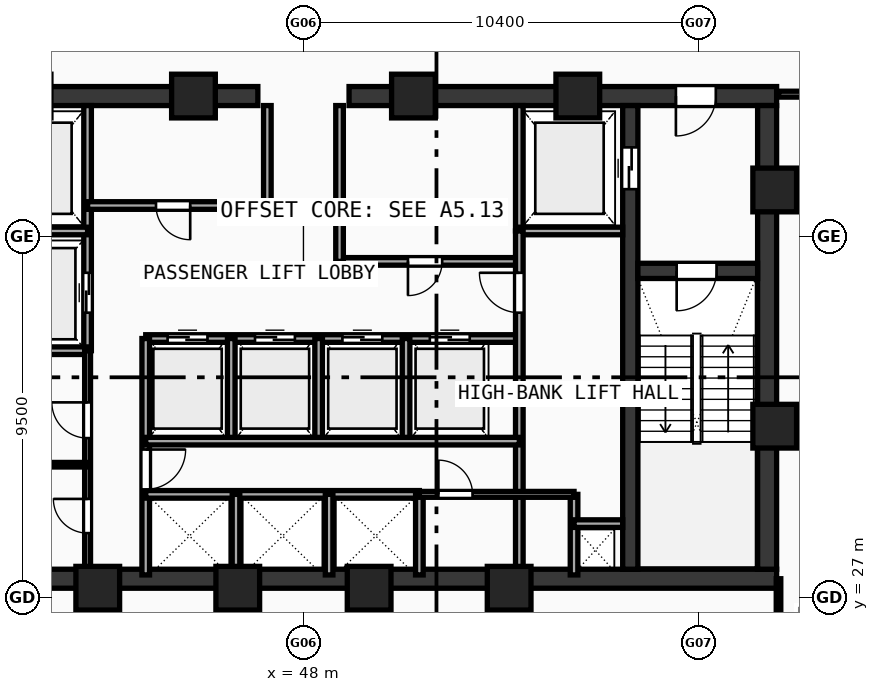
"""IFC4 building model, lengths in metres.
Left out: names, types, materials, properties, quantities, classifications, styles, units other than length and angle.
Written with IfcOpenShell. Run it as: python <this file> out.ifc"""

import sys

from ifc_helpers import new_model, si_unit, direction, frame, frame_2d, origin, origin_with_axes, origin_2d, place, context, subcontext, project, spatial, rectangle, hollow_rectangle, extrude, source, transform, mapped, element, fill, save


model = new_model("IFC4")
c1 = context("Model", 3, precision=1e-05, world=origin(), true_north=direction((0.0, 1.0)))
c2 = subcontext(c1, "Body", "Model", "MODEL_VIEW")
j1 = project(units=[si_unit("LENGTHUNIT", "METRE"), si_unit("PLANEANGLEUNIT", "RADIAN")], contexts=[c1])
p1 = place(None, origin())
s1 = spatial("IfcSite", under=j1, at=p1, CompositionType="ELEMENT")
p2 = place(p1, origin())
s2 = spatial("IfcBuilding", under=s1, at=p2, CompositionType="ELEMENT")
p3 = place(p2, frame((0.0, 0.0, 184.76)))
s3 = spatial("IfcBuildingStorey", under=s2, at=p3, CompositionType="ELEMENT", Elevation=184.76)
p4 = place(p3, frame((35.55, 27.5, 0.0), z_axis=(0.0, 0.0, 1.0), x_axis=(1.0, 0.0, 0.0)))
e1 = element("IfcWall", 1, at=p4, inside=s3, PredefinedType="SHEAR", context=c2, shape_type="SweptSolid", body=[
    extrude(rectangle(XDim=24.9, YDim=0.5, at=frame_2d((12.45, 0.0))), origin(), (0.0, 0.0, 1.0), 3.54),
])
p5 = place(p3, frame((35.55, 40.2, 0.0), z_axis=(0.0, 0.0, 1.0), x_axis=(1.0, 0.0, 0.0)))
e2 = element("IfcWall", 2, at=p5, inside=s3, PredefinedType="SHEAR", context=c2, shape_type="SweptSolid", body=[
    extrude(rectangle(XDim=11.25, YDim=0.5, at=frame_2d((5.625, 0.0))), origin(), (0.0, 0.0, 1.0), 3.54),
])
p6 = place(p5, frame((1.6, 0.0, 0.0)))
e3 = element("IfcOpeningElement", 3, at=p6, cuts=e2, PredefinedType="OPENING", context=c2, shape_type="SweptSolid", body=[
    extrude(rectangle(XDim=1.05, YDim=2.1, at=frame_2d((0.525, 1.05))), frame((0.0, 0.26, 0.0), z_axis=(0.0, -1.0, 0.0), x_axis=(1.0, 0.0, 0.0)), (0.0, 0.0, 1.0), 0.52),
])
p7 = place(p3, frame((49.2, 40.2, 0.0), z_axis=(0.0, 0.0, 1.0), x_axis=(1.0, 0.0, 0.0)))
e4 = element("IfcWall", 4, at=p7, inside=s3, PredefinedType="SHEAR", context=c2, shape_type="SweptSolid", body=[
    extrude(rectangle(XDim=11.25, YDim=0.5, at=frame_2d((5.625, 0.0))), origin(), (0.0, 0.0, 1.0), 3.54),
])
p8 = place(p7, frame((8.6, 0.0, 0.0)))
e5 = element("IfcOpeningElement", 5, at=p8, cuts=e4, PredefinedType="OPENING", context=c2, shape_type="SweptSolid", body=[
    extrude(rectangle(XDim=1.05, YDim=2.1, at=frame_2d((0.525, 1.05))), frame((0.0, 0.26, 0.0), z_axis=(0.0, -1.0, 0.0), x_axis=(1.0, 0.0, 0.0)), (0.0, 0.0, 1.0), 0.52),
])
p9 = place(p3, frame((60.2, 27.75, 0.0), z_axis=(0.0, 0.0, 1.0), x_axis=(0.0, 1.0, 0.0)))
e6 = element("IfcWall", 6, at=p9, inside=s3, PredefinedType="SHEAR", context=c2, shape_type="SweptSolid", body=[
    extrude(rectangle(XDim=12.2, YDim=0.5, at=frame_2d((6.1, 0.0))), origin(), (0.0, 0.0, 1.0), 3.54),
])
p10 = place(p3, frame((56.6, 27.75, 0.0), z_axis=(0.0, 0.0, 1.0), x_axis=(0.0, 1.0, 0.0)))
e7 = element("IfcWall", 7, at=p10, inside=s3, PredefinedType="SHEAR", context=c2, shape_type="SweptSolid", body=[
    extrude(rectangle(XDim=12.2, YDim=0.4, at=frame_2d((6.1, 0.0))), origin(), (0.0, 0.0, 1.0), 3.54),
])
p11 = place(p10, frame((10.0, 0.0, 0.0)))
e8 = element("IfcOpeningElement", 8, at=p11, cuts=e7, PredefinedType="OPENING", context=c2, shape_type="SweptSolid", body=[
    extrude(rectangle(XDim=1.1, YDim=2.1, at=frame_2d((0.55, 1.05))), frame((0.0, 0.21, 0.0), z_axis=(0.0, -1.0, 0.0), x_axis=(1.0, 0.0, 0.0)), (0.0, 0.0, 1.0), 0.42),
])
p12 = place(p3, frame((56.8, 35.6, 0.0), z_axis=(0.0, 0.0, 1.0), x_axis=(1.0, 0.0, 0.0)))
e9 = element("IfcWall", 9, at=p12, inside=s3, PredefinedType="SHEAR", context=c2, shape_type="SweptSolid", body=[
    extrude(rectangle(XDim=3.15, YDim=0.4, at=frame_2d((1.575, 0.0))), origin(), (0.0, 0.0, 1.0), 3.54),
])
p13 = place(p12, frame((1.02, 0.0, 0.0)))
e10 = element("IfcOpeningElement", 10, at=p13, cuts=e9, PredefinedType="OPENING", context=c2, shape_type="SweptSolid", body=[
    extrude(rectangle(XDim=1.05, YDim=2.1, at=frame_2d((0.525, 1.05))), frame((0.0, 0.21, 0.0), z_axis=(0.0, -1.0, 0.0), x_axis=(1.0, 0.0, 0.0)), (0.0, 0.0, 1.0), 0.42),
])
m1 = source(origin(), c2, "Body", "SweptSolid", [
    extrude(hollow_rectangle(XDim=1.15, YDim=1.15, WallThickness=0.048, at=origin_2d()), origin(), (0.0, 0.0, 1.0), 3.8),
])
for number, where, z_axis, x_axis in (
    (11, (42.588, 27.25, -0.26), (0.0, 0.0, 1.0), (1.0, 0.0, 0.0)),
    (12, (46.272, 27.25, -0.26), (0.0, 0.0, 1.0), (1.0, 0.0, 0.0)),
    (13, (49.729, 27.25, -0.26), (0.0, 0.0, 1.0), (1.0, 0.0, 0.0)),
    (14, (53.412, 27.25, -0.26), (0.0, 0.0, 1.0), (1.0, 0.0, 0.0)),
    (15, (60.4, 31.513, -0.26), (0.0, 0.0, 1.0), (1.0, 0.0, 0.0)),
    (16, (60.4, 37.729, -0.26), (0.0, 0.0, 1.0), (1.0, 0.0, 0.0)),
    (17, (55.219, 40.2, -0.26), (0.0, 0.0, 1.0), (1.0, 0.0, 0.0)),
    (18, (50.894, 40.2, -0.26), (0.0, 0.0, 1.0), (1.0, 0.0, 0.0)),
    (19, (45.106, 40.2, -0.26), (0.0, 0.0, 1.0), (1.0, 0.0, 0.0)),
):
    element("IfcColumn", number, at=place(p3, frame(where, z_axis=z_axis, x_axis=x_axis)), inside=s3, PredefinedType="COLUMN", context=c2, shape_type="MappedRepresentation", body=[
        mapped(m1, transform((0.0, 0.0, 0.0), scale=1.0)),
    ])
p14 = place(p3, frame((42.32, 33.5, 0.0), z_axis=(0.0, 0.0, 1.0), x_axis=(0.0, 1.0, 0.0)))
e20 = element("IfcWall", 20, at=p14, inside=s3, PredefinedType="SOLIDWALL", context=c2, shape_type="SweptSolid", body=[
    extrude(rectangle(XDim=6.45, YDim=0.2, at=frame_2d((3.225, 0.0))), origin(), (0.0, 0.0, 1.0), 3.54),
])
p15 = place(p14, frame((1.0, 0.0, 0.0)))
e21 = element("IfcOpeningElement", 21, at=p15, cuts=e20, PredefinedType="OPENING", context=c2, shape_type="SweptSolid", body=[
    extrude(rectangle(XDim=1.05, YDim=2.1, at=frame_2d((0.525, 1.05))), frame((0.0, 0.11, 0.0), z_axis=(0.0, -1.0, 0.0), x_axis=(1.0, 0.0, 0.0)), (0.0, 0.0, 1.0), 0.22),
])
for number, where, z_axis, x_axis in (
    (22, (39.6, 36.65, 0.0), (0.0, 0.0, 1.0), (1.0, 0.0, 0.0)),
    (23, (39.6, 33.5, 0.0), (0.0, 0.0, 1.0), (1.0, 0.0, 0.0)),
):
    element("IfcWall", number, at=place(p3, frame(where, z_axis=z_axis, x_axis=x_axis)), inside=s3, PredefinedType="SOLIDWALL", context=c2, shape_type="SweptSolid", body=[
        extrude(rectangle(XDim=2.72, YDim=0.2, at=frame_2d((1.36, 0.0))), origin(), (0.0, 0.0, 1.0), 3.54),
    ])
p16 = place(p3, frame((53.68, 36.65, 0.0), z_axis=(0.0, 0.0, 1.0), x_axis=(0.0, 1.0, 0.0)))
e24 = element("IfcWall", 24, at=p16, inside=s3, PredefinedType="SOLIDWALL", context=c2, shape_type="SweptSolid", body=[
    extrude(rectangle(XDim=3.3, YDim=0.2, at=frame_2d((1.65, 0.0))), origin(), (0.0, 0.0, 1.0), 3.54),
])
p17 = place(p3, frame((53.68, 36.65, 0.0), z_axis=(0.0, 0.0, 1.0), x_axis=(1.0, 0.0, 0.0)))
e25 = element("IfcWall", 25, at=p17, inside=s3, PredefinedType="SOLIDWALL", context=c2, shape_type="SweptSolid", body=[
    extrude(rectangle(XDim=2.72, YDim=0.2, at=frame_2d((1.36, 0.0))), origin(), (0.0, 0.0, 1.0), 3.54),
])
p18 = place(p3, frame((42.32, 37.32, 0.0), z_axis=(0.0, 0.0, 1.0), x_axis=(1.0, 0.0, 0.0)))
e26 = element("IfcWall", 26, at=p18, inside=s3, PredefinedType="SOLIDWALL", context=c2, shape_type="SweptSolid", body=[
    extrude(rectangle(XDim=4.73, YDim=0.2, at=frame_2d((2.365, 0.0))), origin(), (0.0, 0.0, 1.0), 3.54),
])
p19 = place(p18, frame((1.8, 0.0, 0.0)))
e27 = element("IfcOpeningElement", 27, at=p19, cuts=e26, PredefinedType="OPENING", context=c2, shape_type="SweptSolid", body=[
    extrude(rectangle(XDim=0.9, YDim=2.1, at=frame_2d((0.45, 1.05))), frame((0.0, 0.11, 0.0), z_axis=(0.0, -1.0, 0.0), x_axis=(1.0, 0.0, 0.0)), (0.0, 0.0, 1.0), 0.22),
])
p20 = place(p3, frame((48.95, 35.85, 0.0), z_axis=(0.0, 0.0, 1.0), x_axis=(1.0, 0.0, 0.0)))
e28 = element("IfcWall", 28, at=p20, inside=s3, PredefinedType="SOLIDWALL", context=c2, shape_type="SweptSolid", body=[
    extrude(rectangle(XDim=4.73, YDim=0.2, at=frame_2d((2.365, 0.0))), origin(), (0.0, 0.0, 1.0), 3.54),
])
p21 = place(p20, frame((1.8, 0.0, 0.0)))
e29 = element("IfcOpeningElement", 29, at=p21, cuts=e28, PredefinedType="OPENING", context=c2, shape_type="SweptSolid", body=[
    extrude(rectangle(XDim=0.9, YDim=2.1, at=frame_2d((0.45, 1.05))), frame((0.0, 0.11, 0.0), z_axis=(0.0, -1.0, 0.0), x_axis=(1.0, 0.0, 0.0)), (0.0, 0.0, 1.0), 0.22),
])
p22 = place(p3, frame((47.05, 37.32, 0.0), z_axis=(0.0, 0.0, 1.0), x_axis=(0.0, 1.0, 0.0)))
e30 = element("IfcWall", 30, at=p22, inside=s3, PredefinedType="SOLIDWALL", context=c2, shape_type="SweptSolid", body=[
    extrude(rectangle(XDim=2.63, YDim=0.2, at=frame_2d((1.315, 0.0))), origin(), (0.0, 0.0, 1.0), 3.54),
])
p23 = place(p3, frame((48.95, 35.85, 0.0), z_axis=(0.0, 0.0, 1.0), x_axis=(0.0, 1.0, 0.0)))
e31 = element("IfcWall", 31, at=p23, inside=s3, PredefinedType="SOLIDWALL", context=c2, shape_type="SweptSolid", body=[
    extrude(rectangle(XDim=4.1, YDim=0.2, at=frame_2d((2.05, 0.0))), origin(), (0.0, 0.0, 1.0), 3.54),
])
p24 = place(p3, frame((43.85, 33.82, 0.0), z_axis=(0.0, 0.0, 1.0), x_axis=(1.0, 0.0, 0.0)))
e32 = element("IfcWall", 32, at=p24, inside=s3, PredefinedType="SOLIDWALL", context=c2, shape_type="SweptSolid", body=[
    extrude(rectangle(XDim=9.83, YDim=0.2, at=frame_2d((4.915, 0.0))), origin(), (0.0, 0.0, 1.0), 3.54),
])
p25 = place(p24, frame((0.575, 0.0, 0.0)))
e33 = element("IfcOpeningElement", 33, at=p25, cuts=e32, PredefinedType="OPENING", context=c2, shape_type="SweptSolid", body=[
    extrude(rectangle(XDim=1.05, YDim=2.1, at=frame_2d((0.525, 1.05))), frame((0.0, 0.11, 0.0), z_axis=(0.0, -1.0, 0.0), x_axis=(1.0, 0.0, 0.0)), (0.0, 0.0, 1.0), 0.22),
])
p26 = place(p24, frame((2.875, 0.0, 0.0)))
e34 = element("IfcOpeningElement", 34, at=p26, cuts=e32, PredefinedType="OPENING", context=c2, shape_type="SweptSolid", body=[
    extrude(rectangle(XDim=1.05, YDim=2.1, at=frame_2d((0.525, 1.05))), frame((0.0, 0.11, 0.0), z_axis=(0.0, -1.0, 0.0), x_axis=(1.0, 0.0, 0.0)), (0.0, 0.0, 1.0), 0.22),
])
p27 = place(p24, frame((5.175, 0.0, 0.0)))
e35 = element("IfcOpeningElement", 35, at=p27, cuts=e32, PredefinedType="OPENING", context=c2, shape_type="SweptSolid", body=[
    extrude(rectangle(XDim=1.05, YDim=2.1, at=frame_2d((0.525, 1.05))), frame((0.0, 0.11, 0.0), z_axis=(0.0, -1.0, 0.0), x_axis=(1.0, 0.0, 0.0)), (0.0, 0.0, 1.0), 0.22),
])
p28 = place(p24, frame((7.475, 0.0, 0.0)))
e36 = element("IfcOpeningElement", 36, at=p28, cuts=e32, PredefinedType="OPENING", context=c2, shape_type="SweptSolid", body=[
    extrude(rectangle(XDim=1.05, YDim=2.1, at=frame_2d((0.525, 1.05))), frame((0.0, 0.11, 0.0), z_axis=(0.0, -1.0, 0.0), x_axis=(1.0, 0.0, 0.0)), (0.0, 0.0, 1.0), 0.22),
])
p29 = place(p3, frame((43.85, 27.6, 0.0), z_axis=(0.0, 0.0, 1.0), x_axis=(0.0, 1.0, 0.0)))
e37 = element("IfcWall", 37, at=p29, inside=s3, PredefinedType="SOLIDWALL", context=c2, shape_type="SweptSolid", body=[
    extrude(rectangle(XDim=6.22, YDim=0.2, at=frame_2d((3.11, 0.0))), origin(), (0.0, 0.0, 1.0), 3.54),
])
p30 = place(p29, frame((2.25, 0.0, 0.0)))
e38 = element("IfcOpeningElement", 38, at=p30, cuts=e37, PredefinedType="OPENING", context=c2, shape_type="SweptSolid", body=[
    extrude(rectangle(XDim=1.05, YDim=2.1, at=frame_2d((0.525, 1.05))), frame((0.0, 0.11, 0.0), z_axis=(0.0, -1.0, 0.0), x_axis=(1.0, 0.0, 0.0)), (0.0, 0.0, 1.0), 0.22),
])
p31 = place(p3, frame((53.68, 27.6, 0.0), z_axis=(0.0, 0.0, 1.0), x_axis=(0.0, 1.0, 0.0)))
e39 = element("IfcWall", 39, at=p31, inside=s3, PredefinedType="SOLIDWALL", context=c2, shape_type="SweptSolid", body=[
    extrude(rectangle(XDim=9.05, YDim=0.2, at=frame_2d((4.525, 0.0))), origin(), (0.0, 0.0, 1.0), 3.54),
])
p32 = place(p31, frame((6.9, 0.0, 0.0)))
e40 = element("IfcOpeningElement", 40, at=p32, cuts=e39, PredefinedType="OPENING", context=c2, shape_type="SweptSolid", body=[
    extrude(rectangle(XDim=1.05, YDim=2.1, at=frame_2d((0.525, 1.05))), frame((0.0, 0.11, 0.0), z_axis=(0.0, -1.0, 0.0), x_axis=(1.0, 0.0, 0.0)), (0.0, 0.0, 1.0), 0.22),
])
for number, where, z_axis, x_axis in (
    (41, (46.1, 31.12, 0.0), (0.0, 0.0, 1.0), (0.0, 1.0, 0.0)),
    (42, (48.4, 31.12, 0.0), (0.0, 0.0, 1.0), (0.0, 1.0, 0.0)),
    (43, (50.7, 31.12, 0.0), (0.0, 0.0, 1.0), (0.0, 1.0, 0.0)),
):
    element("IfcWall", number, at=place(p3, frame(where, z_axis=z_axis, x_axis=x_axis)), inside=s3, PredefinedType="SOLIDWALL", context=c2, shape_type="SweptSolid", body=[
        extrude(rectangle(XDim=2.7, YDim=0.2, at=frame_2d((1.35, 0.0))), origin(), (0.0, 0.0, 1.0), 3.54),
    ])
p33 = place(p3, frame((43.85, 29.72, 0.0), z_axis=(0.0, 0.0, 1.0), x_axis=(1.0, 0.0, 0.0)))
e44 = element("IfcWall", 44, at=p33, inside=s3, PredefinedType="SOLIDWALL", context=c2, shape_type="SweptSolid", body=[
    extrude(rectangle(XDim=7.2, YDim=0.2, at=frame_2d((3.6, 0.0))), origin(), (0.0, 0.0, 1.0), 3.54),
])
p34 = place(p3, frame((51.05, 27.6, 0.0), z_axis=(0.0, 0.0, 1.0), x_axis=(0.0, 1.0, 0.0)))
e45 = element("IfcWall", 45, at=p34, inside=s3, PredefinedType="SOLIDWALL", context=c2, shape_type="SweptSolid", body=[
    extrude(rectangle(XDim=2.12, YDim=0.2, at=frame_2d((1.06, 0.0))), origin(), (0.0, 0.0, 1.0), 3.54),
])
p35 = place(p3, frame((43.85, 31.12, 0.0), z_axis=(0.0, 0.0, 1.0), x_axis=(1.0, 0.0, 0.0)))
e46 = element("IfcWall", 46, at=p35, inside=s3, PredefinedType="SOLIDWALL", context=c2, shape_type="SweptSolid", body=[
    extrude(rectangle(XDim=9.83, YDim=0.2, at=frame_2d((4.915, 0.0))), origin(), (0.0, 0.0, 1.0), 3.54),
])
for number, where, z_axis, x_axis in (
    (47, (46.225, 27.6, 0.0), (0.0, 0.0, 1.0), (0.0, 1.0, 0.0)),
    (48, (48.675, 27.6, 0.0), (0.0, 0.0, 1.0), (0.0, 1.0, 0.0)),
    (49, (55.12, 27.6, 0.0), (0.0, 0.0, 1.0), (0.0, 1.0, 0.0)),
):
    element("IfcWall", number, at=place(p3, frame(where, z_axis=z_axis, x_axis=x_axis)), inside=s3, PredefinedType="SOLIDWALL", context=c2, shape_type="SweptSolid", body=[
        extrude(rectangle(XDim=2.12, YDim=0.2, at=frame_2d((1.06, 0.0))), origin(), (0.0, 0.0, 1.0), 3.54),
    ])
p36 = place(p3, frame((55.12, 28.95, 0.0), z_axis=(0.0, 0.0, 1.0), x_axis=(1.0, 0.0, 0.0)))
e50 = element("IfcWall", 50, at=p36, inside=s3, PredefinedType="SOLIDWALL", context=c2, shape_type="SweptSolid", body=[
    extrude(rectangle(XDim=1.28, YDim=0.2, at=frame_2d((0.64, 0.0))), origin(), (0.0, 0.0, 1.0), 3.54),
])
p37 = place(p3, frame((42.32, 27.6, 0.0), z_axis=(0.0, 0.0, 1.0), x_axis=(0.0, 1.0, 0.0)))
e51 = element("IfcWall", 51, at=p37, inside=s3, PredefinedType="PARTITIONING", context=c2, shape_type="SweptSolid", body=[
    extrude(rectangle(XDim=5.9, YDim=0.155, at=frame_2d((2.95, 0.0))), origin(), (0.0, 0.0, 1.0), 3.54),
])
p38 = place(p37, frame((1.1, 0.0, 0.0)))
e52 = element("IfcOpeningElement", 52, at=p38, cuts=e51, PredefinedType="OPENING", context=c2, shape_type="SweptSolid", body=[
    extrude(rectangle(XDim=0.9, YDim=2.1, at=frame_2d((0.45, 1.05))), frame((0.0, 0.087, 0.0), z_axis=(0.0, -1.0, 0.0), x_axis=(1.0, 0.0, 0.0)), (0.0, 0.0, 1.0), 0.175),
])
p39 = place(p37, frame((3.6, 0.0, 0.0)))
e53 = element("IfcOpeningElement", 53, at=p39, cuts=e51, PredefinedType="OPENING", context=c2, shape_type="SweptSolid", body=[
    extrude(rectangle(XDim=0.94, YDim=2.1, at=frame_2d((0.47, 1.05))), frame((0.0, 0.087, 0.0), z_axis=(0.0, -1.0, 0.0), x_axis=(1.0, 0.0, 0.0)), (0.0, 0.0, 1.0), 0.175),
])
p40 = place(p3, frame((51.05, 29.72, 0.0), z_axis=(0.0, 0.0, 1.0), x_axis=(1.0, 0.0, 0.0)))
e54 = element("IfcWall", 54, at=p40, inside=s3, PredefinedType="PARTITIONING", context=c2, shape_type="SweptSolid", body=[
    extrude(rectangle(XDim=4.07, YDim=0.155, at=frame_2d((2.035, 0.0))), origin(), (0.0, 0.0, 1.0), 3.54),
])
p41 = place(p40, frame((0.5, 0.0, 0.0)))
e55 = element("IfcOpeningElement", 55, at=p41, cuts=e54, PredefinedType="OPENING", context=c2, shape_type="SweptSolid", body=[
    extrude(rectangle(XDim=0.9, YDim=2.1, at=frame_2d((0.45, 1.05))), frame((0.0, 0.087, 0.0), z_axis=(0.0, -1.0, 0.0), x_axis=(1.0, 0.0, 0.0)), (0.0, 0.0, 1.0), 0.175),
])
p42 = place(p3, frame((39.6, 30.5, 0.0), z_axis=(0.0, 0.0, 1.0), x_axis=(1.0, 0.0, 0.0)))
e56 = element("IfcWall", 56, at=p42, inside=s3, PredefinedType="PARTITIONING", context=c2, shape_type="SweptSolid", body=[
    extrude(rectangle(XDim=2.72, YDim=0.12, at=frame_2d((1.36, 0.0))), origin(), (0.0, 0.0, 1.0), 3.54),
])
p43 = place(p3, frame((60.5, 40.25, 0.0), z_axis=(0.0, 0.0, 1.0), x_axis=(1.0, 0.0, 0.0)))
e57 = element("IfcWall", 57, at=p43, inside=s3, PredefinedType="PARTITIONING", context=c2, shape_type="SweptSolid", body=[
    extrude(rectangle(XDim=4.05, YDim=0.155, at=frame_2d((2.025, 0.0))), origin(), (0.0, 0.0, 1.0), 3.54),
])
p44 = place(p3, frame((60.5, 23.65, 0.0), z_axis=(0.0, 0.0, 1.0), x_axis=(0.0, 1.0, 0.0)))
e58 = element("IfcWall", 58, at=p44, inside=s3, PredefinedType="PARTITIONING", context=c2, shape_type="SweptSolid", body=[
    extrude(rectangle(XDim=3.85, YDim=0.12, at=frame_2d((1.925, 0.0))), origin(), (0.0, 0.0, 1.0), 3.14),
])
m2 = source(origin(), c2, "Body", "SweptSolid", [
    extrude(rectangle(XDim=1.05, YDim=2.1, at=frame_2d((0.525, 1.05))), frame((0.0, 0.025, 0.0), z_axis=(0.0, -1.0, 0.0), x_axis=(1.0, 0.0, 0.0)), (0.0, 0.0, 1.0), 0.05),
])
p45 = place(p13, frame((1.05, 0.0, 0.0), z_axis=(0.0, 0.0, 1.0), x_axis=(-1.0, 0.0, 0.0)))
e59 = element("IfcDoor", 59, at=p45, inside=s3, OperationType="SINGLE_SWING_RIGHT", PredefinedType="DOOR", context=c2, shape_type="MappedRepresentation", body=[
    mapped(m2, transform((0.0, 0.0, 0.0), scale=1.0)),
])
fill(e10, e59)
p46 = place(p8, frame((1.05, 0.0, 0.0), z_axis=(0.0, 0.0, 1.0), x_axis=(-1.0, 0.0, 0.0)))
e60 = element("IfcDoor", 60, at=p46, inside=s3, OperationType="SINGLE_SWING_RIGHT", PredefinedType="DOOR", context=c2, shape_type="MappedRepresentation", body=[
    mapped(m2, transform((0.0, 0.0, 0.0), scale=1.0)),
])
fill(e5, e60)
m3 = source(origin(), c2, "Body", "SweptSolid", [
    extrude(rectangle(XDim=1.1, YDim=2.1, at=frame_2d((0.55, 1.05))), frame((0.0, 0.025, 0.0), z_axis=(0.0, -1.0, 0.0), x_axis=(1.0, 0.0, 0.0)), (0.0, 0.0, 1.0), 0.05),
])
p47 = place(p11, origin_with_axes())
e61 = element("IfcDoor", 61, at=p47, inside=s3, OperationType="DOUBLE_DOOR_SLIDING", PredefinedType="DOOR", context=c2, shape_type="MappedRepresentation", body=[
    mapped(m3, transform((0.0, 0.0, 0.0), scale=1.0)),
])
fill(e8, e61)
p48 = place(p15, origin_with_axes())
e62 = element("IfcDoor", 62, at=p48, inside=s3, OperationType="DOUBLE_DOOR_SLIDING", PredefinedType="DOOR", context=c2, shape_type="MappedRepresentation", body=[
    mapped(m2, transform((0.0, 0.0, 0.0), scale=1.0)),
])
fill(e21, e62)
m4 = source(origin(), c2, "Body", "SweptSolid", [
    extrude(rectangle(XDim=0.9, YDim=2.1, at=frame_2d((0.45, 1.05))), frame((0.0, 0.025, 0.0), z_axis=(0.0, -1.0, 0.0), x_axis=(1.0, 0.0, 0.0)), (0.0, 0.0, 1.0), 0.05),
])
p49 = place(p19, frame((0.9, 0.0, 0.0), z_axis=(0.0, 0.0, 1.0), x_axis=(-1.0, 0.0, 0.0)))
e63 = element("IfcDoor", 63, at=p49, inside=s3, OperationType="SINGLE_SWING_LEFT", PredefinedType="DOOR", context=c2, shape_type="MappedRepresentation", body=[
    mapped(m4, transform((0.0, 0.0, 0.0), scale=1.0)),
])
fill(e27, e63)
p50 = place(p21, frame((0.9, 0.0, 0.0), z_axis=(0.0, 0.0, 1.0), x_axis=(-1.0, 0.0, 0.0)))
e64 = element("IfcDoor", 64, at=p50, inside=s3, OperationType="SINGLE_SWING_RIGHT", PredefinedType="DOOR", context=c2, shape_type="MappedRepresentation", body=[
    mapped(m4, transform((0.0, 0.0, 0.0), scale=1.0)),
])
fill(e29, e64)
p51 = place(p25, origin_with_axes())
e65 = element("IfcDoor", 65, at=p51, inside=s3, OperationType="DOUBLE_DOOR_SLIDING", PredefinedType="DOOR", context=c2, shape_type="MappedRepresentation", body=[
    mapped(m2, transform((0.0, 0.0, 0.0), scale=1.0)),
])
fill(e33, e65)
p52 = place(p26, origin_with_axes())
e66 = element("IfcDoor", 66, at=p52, inside=s3, OperationType="DOUBLE_DOOR_SLIDING", PredefinedType="DOOR", context=c2, shape_type="MappedRepresentation", body=[
    mapped(m2, transform((0.0, 0.0, 0.0), scale=1.0)),
])
fill(e34, e66)
p53 = place(p27, origin_with_axes())
e67 = element("IfcDoor", 67, at=p53, inside=s3, OperationType="DOUBLE_DOOR_SLIDING", PredefinedType="DOOR", context=c2, shape_type="MappedRepresentation", body=[
    mapped(m2, transform((0.0, 0.0, 0.0), scale=1.0)),
])
fill(e35, e67)
p54 = place(p28, origin_with_axes())
e68 = element("IfcDoor", 68, at=p54, inside=s3, OperationType="DOUBLE_DOOR_SLIDING", PredefinedType="DOOR", context=c2, shape_type="MappedRepresentation", body=[
    mapped(m2, transform((0.0, 0.0, 0.0), scale=1.0)),
])
fill(e36, e68)
p55 = place(p30, frame((1.05, 0.0, 0.0), z_axis=(0.0, 0.0, 1.0), x_axis=(-1.0, 0.0, 0.0)))
e69 = element("IfcDoor", 69, at=p55, inside=s3, OperationType="SINGLE_SWING_LEFT", PredefinedType="DOOR", context=c2, shape_type="MappedRepresentation", body=[
    mapped(m2, transform((0.0, 0.0, 0.0), scale=1.0)),
])
fill(e38, e69)
p56 = place(p32, origin_with_axes())
e70 = element("IfcDoor", 70, at=p56, inside=s3, OperationType="SINGLE_SWING_RIGHT", PredefinedType="DOOR", context=c2, shape_type="MappedRepresentation", body=[
    mapped(m2, transform((0.0, 0.0, 0.0), scale=1.0)),
])
fill(e40, e70)
p57 = place(p38, origin_with_axes())
e71 = element("IfcDoor", 71, at=p57, inside=s3, OperationType="SINGLE_SWING_RIGHT", PredefinedType="DOOR", context=c2, shape_type="MappedRepresentation", body=[
    mapped(m4, transform((0.0, 0.0, 0.0), scale=1.0)),
])
fill(e52, e71)
m5 = source(origin(), c2, "Body", "SweptSolid", [
    extrude(rectangle(XDim=0.94, YDim=2.1, at=frame_2d((0.47, 1.05))), frame((0.0, 0.025, 0.0), z_axis=(0.0, -1.0, 0.0), x_axis=(1.0, 0.0, 0.0)), (0.0, 0.0, 1.0), 0.05),
])
p58 = place(p39, origin_with_axes())
e72 = element("IfcDoor", 72, at=p58, inside=s3, OperationType="SINGLE_SWING_RIGHT", PredefinedType="DOOR", context=c2, shape_type="MappedRepresentation", body=[
    mapped(m5, transform((0.0, 0.0, 0.0), scale=1.0)),
])
fill(e53, e72)
p59 = place(p41, origin_with_axes())
e73 = element("IfcDoor", 73, at=p59, inside=s3, OperationType="SINGLE_SWING_LEFT", PredefinedType="DOOR", context=c2, shape_type="MappedRepresentation", body=[
    mapped(m4, transform((0.0, 0.0, 0.0), scale=1.0)),
])
fill(e55, e73)
save(model, sys.argv[1])
